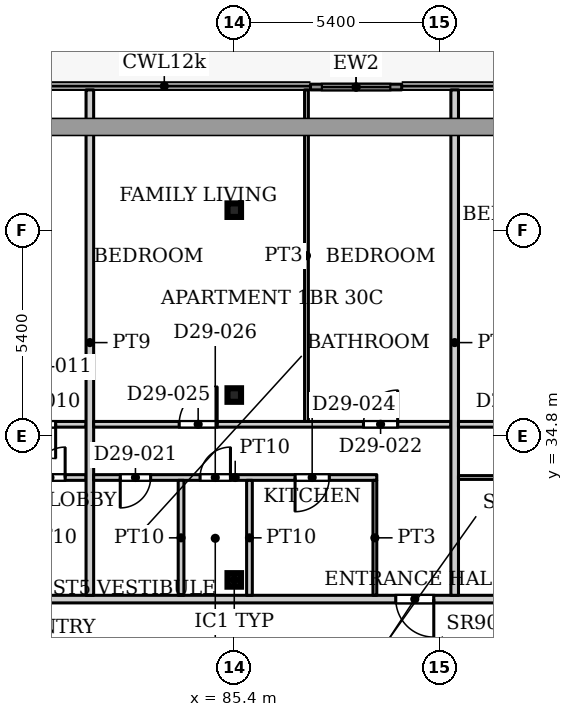
"""IFC4 building model, lengths in metres.
Left out: names, types, materials, properties, quantities, classifications, styles, units other than length and angle.
Written with IfcOpenShell. Run it as: python <this file> out.ifc"""

import sys

from ifc_helpers import new_model, si_unit, direction, frame, frame_2d, origin, origin_2d, place, context, subcontext, project, spatial, rectangle, hollow_rectangle, extrude, source, transform, mapped, element, fill, save


model = new_model("IFC4")
c1 = context("Model", 3, precision=1e-05, world=origin(), true_north=direction((0.0, 1.0)))
c2 = subcontext(c1, "Body", "Model", "MODEL_VIEW")
j1 = project(units=[si_unit("LENGTHUNIT", "METRE"), si_unit("PLANEANGLEUNIT", "RADIAN")], contexts=[c1])
p1 = place(None, origin())
s1 = spatial("IfcSite", under=j1, at=p1, CompositionType="ELEMENT")
p2 = place(p1, origin())
s2 = spatial("IfcBuilding", under=s1, at=p2, CompositionType="ELEMENT")
p3 = place(p2, frame((0.0, 0.0, 129.2)))
s3 = spatial("IfcBuildingStorey", under=s2, at=p3, CompositionType="ELEMENT", Elevation=129.2)
for number, where, z_axis, x_axis in (
    (1, (85.4, 31.005, 0.0), (0.0, 0.0, 1.0), (1.0, 0.0, 0.0)),
    (2, (85.4, 35.87, 0.0), (0.0, 0.0, 1.0), (1.0, 0.0, 0.0)),
    (3, (85.4, 40.735, 0.0), (0.0, 0.0, 1.0), (1.0, 0.0, 0.0)),
):
    element("IfcColumn", number, at=place(p3, frame(where, z_axis=z_axis, x_axis=x_axis)), inside=s3, PredefinedType="COLUMN", context=c2, shape_type="SweptSolid", body=[
        extrude(hollow_rectangle(XDim=0.356, YDim=0.356, WallThickness=0.016, InnerFilletRadius=0.016, OuterFilletRadius=0.032, at=origin_2d()), origin(), (0.0, 0.0, 1.0), 3.9),
    ])
p4 = place(p3, frame((87.406, 43.975, 0.0), z_axis=(0.0, 0.0, 1.0), x_axis=(1.0, 0.0, 0.0)))
e4 = element("IfcWall", 4, at=p4, inside=s3, PredefinedType="SOLIDWALL", context=c2, shape_type="SweptSolid", body=[
    extrude(rectangle(XDim=2.4, YDim=0.15, at=frame_2d((1.2, 0.0))), origin(), (0.0, 0.0, 1.0), 3.75),
])
p5 = place(p4, frame((0.3, 0.0, 0.0)))
e5 = element("IfcOpeningElement", 5, at=p5, cuts=e4, PredefinedType="OPENING", context=c2, shape_type="SweptSolid", body=[
    extrude(rectangle(XDim=1.8, YDim=2.4, at=frame_2d((0.9, 1.2))), frame((0.0, 0.085, 0.0), z_axis=(0.0, -1.0, 0.0), x_axis=(1.0, 0.0, 0.0)), (0.0, 0.0, 1.0), 0.17),
])
p6 = place(p3, frame((55.9, 30.5, 0.0), z_axis=(0.0, 0.0, 1.0), x_axis=(1.0, 0.0, 0.0)))
e6 = element("IfcWall", 6, at=p6, inside=s3, PredefinedType="PARTITIONING", context=c2, shape_type="SweptSolid", body=[
    extrude(rectangle(XDim=42.2, YDim=0.2, at=frame_2d((21.1, 0.0))), origin(), (0.0, 0.0, 1.0), 3.6),
])
p7 = place(p6, frame((0.45, 0.0, 0.0)))
e7 = element("IfcOpeningElement", 7, at=p7, cuts=e6, PredefinedType="OPENING", context=c2, shape_type="SweptSolid", body=[
    extrude(rectangle(XDim=1.0, YDim=2.1, at=frame_2d((0.5, 1.05))), frame((0.0, 0.11, 0.0), z_axis=(0.0, -1.0, 0.0), x_axis=(1.0, 0.0, 0.0)), (0.0, 0.0, 1.0), 0.22),
])
p8 = place(p6, frame((20.1, 0.0, 0.0)))
e8 = element("IfcOpeningElement", 8, at=p8, cuts=e6, PredefinedType="OPENING", context=c2, shape_type="SweptSolid", body=[
    extrude(rectangle(XDim=1.0, YDim=2.1, at=frame_2d((0.5, 1.05))), frame((0.0, 0.11, 0.0), z_axis=(0.0, -1.0, 0.0), x_axis=(1.0, 0.0, 0.0)), (0.0, 0.0, 1.0), 0.22),
])
p9 = place(p6, frame((33.75, 0.0, 0.0)))
e9 = element("IfcOpeningElement", 9, at=p9, cuts=e6, PredefinedType="OPENING", context=c2, shape_type="SweptSolid", body=[
    extrude(rectangle(XDim=1.0, YDim=2.1, at=frame_2d((0.5, 1.05))), frame((0.0, 0.11, 0.0), z_axis=(0.0, -1.0, 0.0), x_axis=(1.0, 0.0, 0.0)), (0.0, 0.0, 1.0), 0.22),
])
p10 = place(p6, frame((38.7, 0.0, 0.0)))
e10 = element("IfcOpeningElement", 10, at=p10, cuts=e6, PredefinedType="OPENING", context=c2, shape_type="SweptSolid", body=[
    extrude(rectangle(XDim=1.0, YDim=2.1, at=frame_2d((0.5, 1.05))), frame((0.0, 0.11, 0.0), z_axis=(0.0, -1.0, 0.0), x_axis=(1.0, 0.0, 0.0)), (0.0, 0.0, 1.0), 0.22),
])
p11 = place(p3, frame((65.8, 35.1, 0.0), z_axis=(0.0, 0.0, 1.0), x_axis=(1.0, 0.0, 0.0)))
e11 = element("IfcWall", 11, at=p11, inside=s3, PredefinedType="PARTITIONING", context=c2, shape_type="SweptSolid", body=[
    extrude(rectangle(XDim=15.7, YDim=0.15, at=frame_2d((7.85, 0.0))), origin(), (0.0, 0.0, 1.0), 3.6),
])
p12 = place(p11, frame((3.95, 0.0, 0.0)))
e12 = element("IfcOpeningElement", 12, at=p12, cuts=e11, PredefinedType="OPENING", context=c2, shape_type="SweptSolid", body=[
    extrude(rectangle(XDim=0.9, YDim=2.1, at=frame_2d((0.45, 1.05))), frame((0.0, 0.085, 0.0), z_axis=(0.0, -1.0, 0.0), x_axis=(1.0, 0.0, 0.0)), (0.0, 0.0, 1.0), 0.17),
])
p13 = place(p11, frame((14.0, 0.0, 0.0)))
e13 = element("IfcOpeningElement", 13, at=p13, cuts=e11, PredefinedType="OPENING", context=c2, shape_type="SweptSolid", body=[
    extrude(rectangle(XDim=0.9, YDim=2.1, at=frame_2d((0.45, 1.05))), frame((0.0, 0.085, 0.0), z_axis=(0.0, -1.0, 0.0), x_axis=(1.0, 0.0, 0.0)), (0.0, 0.0, 1.0), 0.17),
])
p14 = place(p11, frame((1.05, 0.0, 0.0)))
e14 = element("IfcOpeningElement", 14, at=p14, cuts=e11, PredefinedType="OPENING", context=c2, shape_type="SweptSolid", body=[
    extrude(rectangle(XDim=1.0, YDim=2.1, at=frame_2d((0.5, 1.05))), frame((0.0, 0.085, 0.0), z_axis=(0.0, -1.0, 0.0), x_axis=(1.0, 0.0, 0.0)), (0.0, 0.0, 1.0), 0.17),
])
p15 = place(p11, frame((10.5, 0.0, 0.0)))
e15 = element("IfcOpeningElement", 15, at=p15, cuts=e11, PredefinedType="OPENING", context=c2, shape_type="SweptSolid", body=[
    extrude(rectangle(XDim=1.6, YDim=2.1, at=frame_2d((0.8, 1.05))), frame((0.0, 0.085, 0.0), z_axis=(0.0, -1.0, 0.0), x_axis=(1.0, 0.0, 0.0)), (0.0, 0.0, 1.0), 0.17),
])
p16 = place(p11, frame((6.05, 0.0, 0.0)))
e16 = element("IfcOpeningElement", 16, at=p16, cuts=e11, PredefinedType="OPENING", context=c2, shape_type="SweptSolid", body=[
    extrude(rectangle(XDim=0.9, YDim=2.1, at=frame_2d((0.45, 1.05))), frame((0.0, 0.085, 0.0), z_axis=(0.0, -1.0, 0.0), x_axis=(1.0, 0.0, 0.0)), (0.0, 0.0, 1.0), 0.17),
])
p17 = place(p3, frame((77.325, 33.7, 0.0), z_axis=(0.0, 0.0, 1.0), x_axis=(1.0, 0.0, 0.0)))
e17 = element("IfcWall", 17, at=p17, inside=s3, PredefinedType="PARTITIONING", context=c2, shape_type="SweptSolid", body=[
    extrude(rectangle(XDim=4.175, YDim=0.15, at=frame_2d((2.087, 0.0))), origin(), (0.0, 0.0, 1.0), 3.6),
])
p18 = place(p17, frame((0.725, 0.0, 0.0)))
e18 = element("IfcOpeningElement", 18, at=p18, cuts=e17, PredefinedType="OPENING", context=c2, shape_type="SweptSolid", body=[
    extrude(rectangle(XDim=0.8, YDim=2.1, at=frame_2d((0.4, 1.05))), frame((0.0, 0.085, 0.0), z_axis=(0.0, -1.0, 0.0), x_axis=(1.0, 0.0, 0.0)), (0.0, 0.0, 1.0), 0.17),
])
p19 = place(p17, frame((2.825, 0.0, 0.0)))
e19 = element("IfcOpeningElement", 19, at=p19, cuts=e17, PredefinedType="OPENING", context=c2, shape_type="SweptSolid", body=[
    extrude(rectangle(XDim=0.8, YDim=2.1, at=frame_2d((0.4, 1.05))), frame((0.0, 0.085, 0.0), z_axis=(0.0, -1.0, 0.0), x_axis=(1.0, 0.0, 0.0)), (0.0, 0.0, 1.0), 0.17),
])
p20 = place(p3, frame((81.6, 30.6, 0.0), z_axis=(0.0, 0.0, 1.0), x_axis=(0.0, 1.0, 0.0)))
e20 = element("IfcWall", 20, at=p20, inside=s3, PredefinedType="PARTITIONING", context=c2, shape_type="SweptSolid", body=[
    extrude(rectangle(XDim=13.3, YDim=0.2, at=frame_2d((6.65, 0.0))), origin(), (0.0, 0.0, 1.0), 3.6),
])
p21 = place(p3, frame((81.7, 33.7, 0.0), z_axis=(0.0, 0.0, 1.0), x_axis=(1.0, 0.0, 0.0)))
e21 = element("IfcWall", 21, at=p21, inside=s3, PredefinedType="PARTITIONING", context=c2, shape_type="SweptSolid", body=[
    extrude(rectangle(XDim=7.45, YDim=0.15, at=frame_2d((3.725, 0.0))), origin(), (0.0, 0.0, 1.0), 3.6),
])
p22 = place(p21, frame((0.7, 0.0, 0.0)))
e22 = element("IfcOpeningElement", 22, at=p22, cuts=e21, PredefinedType="OPENING", context=c2, shape_type="SweptSolid", body=[
    extrude(rectangle(XDim=0.8, YDim=2.1, at=frame_2d((0.4, 1.05))), frame((0.0, 0.085, 0.0), z_axis=(0.0, -1.0, 0.0), x_axis=(1.0, 0.0, 0.0)), (0.0, 0.0, 1.0), 0.17),
])
p23 = place(p21, frame((5.3, 0.0, 0.0)))
e23 = element("IfcOpeningElement", 23, at=p23, cuts=e21, PredefinedType="OPENING", context=c2, shape_type="SweptSolid", body=[
    extrude(rectangle(XDim=0.9, YDim=2.1, at=frame_2d((0.45, 1.05))), frame((0.0, 0.085, 0.0), z_axis=(0.0, -1.0, 0.0), x_axis=(1.0, 0.0, 0.0)), (0.0, 0.0, 1.0), 0.17),
])
p24 = place(p21, frame((2.8, 0.0, 0.0)))
e24 = element("IfcOpeningElement", 24, at=p24, cuts=e21, PredefinedType="OPENING", context=c2, shape_type="SweptSolid", body=[
    extrude(rectangle(XDim=0.8, YDim=2.1, at=frame_2d((0.4, 1.05))), frame((0.0, 0.085, 0.0), z_axis=(0.0, -1.0, 0.0), x_axis=(1.0, 0.0, 0.0)), (0.0, 0.0, 1.0), 0.17),
])
p25 = place(p3, frame((81.7, 35.1, 0.0), z_axis=(0.0, 0.0, 1.0), x_axis=(1.0, 0.0, 0.0)))
e25 = element("IfcWall", 25, at=p25, inside=s3, PredefinedType="PARTITIONING", context=c2, shape_type="SweptSolid", body=[
    extrude(rectangle(XDim=9.4, YDim=0.15, at=frame_2d((4.7, 0.0))), origin(), (0.0, 0.0, 1.0), 3.6),
])
p26 = place(p25, frame((7.1, 0.0, 0.0)))
e26 = element("IfcOpeningElement", 26, at=p26, cuts=e25, PredefinedType="OPENING", context=c2, shape_type="SweptSolid", body=[
    extrude(rectangle(XDim=0.9, YDim=2.1, at=frame_2d((0.45, 1.05))), frame((0.0, 0.085, 0.0), z_axis=(0.0, -1.0, 0.0), x_axis=(1.0, 0.0, 0.0)), (0.0, 0.0, 1.0), 0.17),
])
p27 = place(p25, frame((2.25, 0.0, 0.0)))
e27 = element("IfcOpeningElement", 27, at=p27, cuts=e25, PredefinedType="OPENING", context=c2, shape_type="SweptSolid", body=[
    extrude(rectangle(XDim=1.0, YDim=2.1, at=frame_2d((0.5, 1.05))), frame((0.0, 0.085, 0.0), z_axis=(0.0, -1.0, 0.0), x_axis=(1.0, 0.0, 0.0)), (0.0, 0.0, 1.0), 0.17),
])
for number, where, z_axis, x_axis in (
    (28, (84.0, 30.6, 0.0), (0.0, 0.0, 1.0), (0.0, 1.0, 0.0)),
    (29, (85.8, 30.6, 0.0), (0.0, 0.0, 1.0), (0.0, 1.0, 0.0)),
):
    element("IfcWall", number, at=place(p3, frame(where, z_axis=z_axis, x_axis=x_axis)), inside=s3, PredefinedType="PARTITIONING", context=c2, shape_type="SweptSolid", body=[
        extrude(rectangle(XDim=3.025, YDim=0.15, at=frame_2d((1.512, 0.0))), origin(), (0.0, 0.0, 1.0), 3.6),
    ])
p28 = place(p3, frame((87.3, 35.175, 0.0), z_axis=(0.0, 0.0, 1.0), x_axis=(0.0, 1.0, 0.0)))
e30 = element("IfcWall", 30, at=p28, inside=s3, PredefinedType="PARTITIONING", context=c2, shape_type="SweptSolid", body=[
    extrude(rectangle(XDim=8.725, YDim=0.1, at=frame_2d((4.362, 0.0))), origin(), (0.0, 0.0, 1.0), 3.6),
])
p29 = place(p3, frame((89.1, 30.6, 0.0), z_axis=(0.0, 0.0, 1.0), x_axis=(0.0, 1.0, 0.0)))
e31 = element("IfcWall", 31, at=p29, inside=s3, PredefinedType="PARTITIONING", context=c2, shape_type="SweptSolid", body=[
    extrude(rectangle(XDim=3.025, YDim=0.1, at=frame_2d((1.512, 0.0))), origin(), (0.0, 0.0, 1.0), 3.6),
])
p30 = place(p3, frame((91.2, 30.6, 0.0), z_axis=(0.0, 0.0, 1.0), x_axis=(0.0, 1.0, 0.0)))
e32 = element("IfcWall", 32, at=p30, inside=s3, PredefinedType="PARTITIONING", context=c2, shape_type="SweptSolid", body=[
    extrude(rectangle(XDim=13.3, YDim=0.2, at=frame_2d((6.65, 0.0))), origin(), (0.0, 0.0, 1.0), 3.6),
])
p31 = place(p3, frame((91.3, 33.7, 0.0), z_axis=(0.0, 0.0, 1.0), x_axis=(1.0, 0.0, 0.0)))
e33 = element("IfcWall", 33, at=p31, inside=s3, PredefinedType="PARTITIONING", context=c2, shape_type="SweptSolid", body=[
    extrude(rectangle(XDim=2.85, YDim=0.1, at=frame_2d((1.425, 0.0))), origin(), (0.0, 0.0, 1.0), 3.6),
])
p32 = place(p31, frame((0.95, 0.0, 0.0)))
e34 = element("IfcOpeningElement", 34, at=p32, cuts=e33, PredefinedType="OPENING", context=c2, shape_type="SweptSolid", body=[
    extrude(rectangle(XDim=0.9, YDim=2.1, at=frame_2d((0.45, 1.05))), frame((0.0, 0.06, 0.0), z_axis=(0.0, -1.0, 0.0), x_axis=(1.0, 0.0, 0.0)), (0.0, 0.0, 1.0), 0.12),
])
p33 = place(p3, frame((91.3, 35.1, 0.0), z_axis=(0.0, 0.0, 1.0), x_axis=(1.0, 0.0, 0.0)))
e35 = element("IfcWall", 35, at=p33, inside=s3, PredefinedType="PARTITIONING", context=c2, shape_type="SweptSolid", body=[
    extrude(rectangle(XDim=8.6, YDim=0.15, at=frame_2d((4.3, 0.0))), origin(), (0.0, 0.0, 1.0), 3.6),
])
p34 = place(p33, frame((1.1, 0.0, 0.0)))
e36 = element("IfcOpeningElement", 36, at=p34, cuts=e35, PredefinedType="OPENING", context=c2, shape_type="SweptSolid", body=[
    extrude(rectangle(XDim=0.9, YDim=2.1, at=frame_2d((0.45, 1.05))), frame((0.0, 0.085, 0.0), z_axis=(0.0, -1.0, 0.0), x_axis=(1.0, 0.0, 0.0)), (0.0, 0.0, 1.0), 0.17),
])
p35 = place(p33, frame((5.4, 0.0, 0.0)))
e37 = element("IfcOpeningElement", 37, at=p35, cuts=e35, PredefinedType="OPENING", context=c2, shape_type="SweptSolid", body=[
    extrude(rectangle(XDim=1.0, YDim=2.1, at=frame_2d((0.5, 1.05))), frame((0.0, 0.085, 0.0), z_axis=(0.0, -1.0, 0.0), x_axis=(1.0, 0.0, 0.0)), (0.0, 0.0, 1.0), 0.17),
])
m1 = source(origin(), c2, "Body", "SweptSolid", [
    extrude(rectangle(XDim=1.8, YDim=2.4, at=frame_2d((0.9, 1.2))), frame((0.0, 0.025, 0.0), z_axis=(0.0, -1.0, 0.0), x_axis=(1.0, 0.0, 0.0)), (0.0, 0.0, 1.0), 0.05),
])
p36 = place(p5, origin())
e38 = element("IfcDoor", 38, at=p36, inside=s3, OperationType="SLIDING_TO_LEFT", PredefinedType="DOOR", context=c2, shape_type="MappedRepresentation", body=[
    mapped(m1, transform((0.0, 0.0, 0.0), x_axis=(1.0, 0.0, 0.0), y_axis=(0.0, 1.0, 0.0), z_axis=(0.0, 0.0, 1.0), scale=1.0)),
])
fill(e5, e38)
m2 = source(origin(), c2, "Body", "SweptSolid", [
    extrude(rectangle(XDim=0.9, YDim=2.1, at=frame_2d((0.45, 1.05))), frame((0.0, 0.025, 0.0), z_axis=(0.0, -1.0, 0.0), x_axis=(1.0, 0.0, 0.0)), (0.0, 0.0, 1.0), 0.05),
])
p37 = place(p13, origin())
e39 = element("IfcDoor", 39, at=p37, inside=s3, OperationType="SINGLE_SWING_RIGHT", PredefinedType="DOOR", context=c2, shape_type="MappedRepresentation", body=[
    mapped(m2, transform((0.0, 0.0, 0.0), x_axis=(1.0, 0.0, 0.0), y_axis=(0.0, 1.0, 0.0), z_axis=(0.0, 0.0, 1.0), scale=1.0)),
])
fill(e13, e39)
m3 = source(origin(), c2, "Body", "SweptSolid", [
    extrude(rectangle(XDim=0.8, YDim=2.1, at=frame_2d((0.4, 1.05))), frame((0.0, 0.025, 0.0), z_axis=(0.0, -1.0, 0.0), x_axis=(1.0, 0.0, 0.0)), (0.0, 0.0, 1.0), 0.05),
])
p38 = place(p19, origin())
e40 = element("IfcDoor", 40, at=p38, inside=s3, OperationType="SINGLE_SWING_LEFT", PredefinedType="DOOR", context=c2, shape_type="MappedRepresentation", body=[
    mapped(m3, transform((0.0, 0.0, 0.0), x_axis=(1.0, 0.0, 0.0), y_axis=(0.0, 1.0, 0.0), z_axis=(0.0, 0.0, 1.0), scale=1.0)),
])
fill(e19, e40)
p39 = place(p22, origin())
e41 = element("IfcDoor", 41, at=p39, inside=s3, OperationType="SINGLE_SWING_RIGHT", PredefinedType="DOOR", context=c2, shape_type="MappedRepresentation", body=[
    mapped(m3, transform((0.0, 0.0, 0.0), x_axis=(1.0, 0.0, 0.0), y_axis=(0.0, 1.0, 0.0), z_axis=(0.0, 0.0, 1.0), scale=1.0)),
])
fill(e22, e41)
p40 = place(p26, origin())
e42 = element("IfcDoor", 42, at=p40, inside=s3, OperationType="SINGLE_SWING_LEFT", PredefinedType="DOOR", context=c2, shape_type="MappedRepresentation", body=[
    mapped(m2, transform((0.0, 0.0, 0.0), x_axis=(1.0, 0.0, 0.0), y_axis=(0.0, 1.0, 0.0), z_axis=(0.0, 0.0, 1.0), scale=1.0)),
])
fill(e26, e42)
m4 = source(origin(), c2, "Body", "SweptSolid", [
    extrude(rectangle(XDim=1.0, YDim=2.1, at=frame_2d((0.5, 1.05))), frame((0.0, 0.025, 0.0), z_axis=(0.0, -1.0, 0.0), x_axis=(1.0, 0.0, 0.0)), (0.0, 0.0, 1.0), 0.05),
])
p41 = place(p9, origin())
e43 = element("IfcDoor", 43, at=p41, inside=s3, OperationType="SINGLE_SWING_RIGHT", PredefinedType="DOOR", context=c2, shape_type="MappedRepresentation", body=[
    mapped(m4, transform((0.0, 0.0, 0.0), x_axis=(1.0, 0.0, 0.0), y_axis=(0.0, 1.0, 0.0), z_axis=(0.0, 0.0, 1.0), scale=1.0)),
])
fill(e9, e43)
p42 = place(p23, origin())
e44 = element("IfcDoor", 44, at=p42, inside=s3, OperationType="SINGLE_SWING_RIGHT", PredefinedType="DOOR", context=c2, shape_type="MappedRepresentation", body=[
    mapped(m2, transform((0.0, 0.0, 0.0), x_axis=(1.0, 0.0, 0.0), y_axis=(0.0, 1.0, 0.0), z_axis=(0.0, 0.0, 1.0), scale=1.0)),
])
fill(e23, e44)
m5 = source(origin(), c2, "Body", "SweptSolid", [
    extrude(rectangle(XDim=1.0, YDim=2.1, at=frame_2d((0.5, 1.05))), frame((0.0, 0.025, 0.0), z_axis=(0.0, -1.0, 0.0), x_axis=(1.0, 0.0, 0.0)), (0.0, 0.0, 1.0), 0.05),
])
p43 = place(p27, origin())
e45 = element("IfcDoor", 45, at=p43, inside=s3, OperationType="SINGLE_SWING_LEFT", PredefinedType="DOOR", context=c2, shape_type="MappedRepresentation", body=[
    mapped(m5, transform((0.0, 0.0, 0.0), x_axis=(1.0, 0.0, 0.0), y_axis=(0.0, 1.0, 0.0), z_axis=(0.0, 0.0, 1.0), scale=1.0)),
])
fill(e27, e45)
p44 = place(p24, origin())
e46 = element("IfcDoor", 46, at=p44, inside=s3, OperationType="SINGLE_SWING_LEFT", PredefinedType="DOOR", context=c2, shape_type="MappedRepresentation", body=[
    mapped(m3, transform((0.0, 0.0, 0.0), x_axis=(1.0, 0.0, 0.0), y_axis=(0.0, 1.0, 0.0), z_axis=(0.0, 0.0, 1.0), scale=1.0)),
])
fill(e24, e46)
save(model, sys.argv[1])
